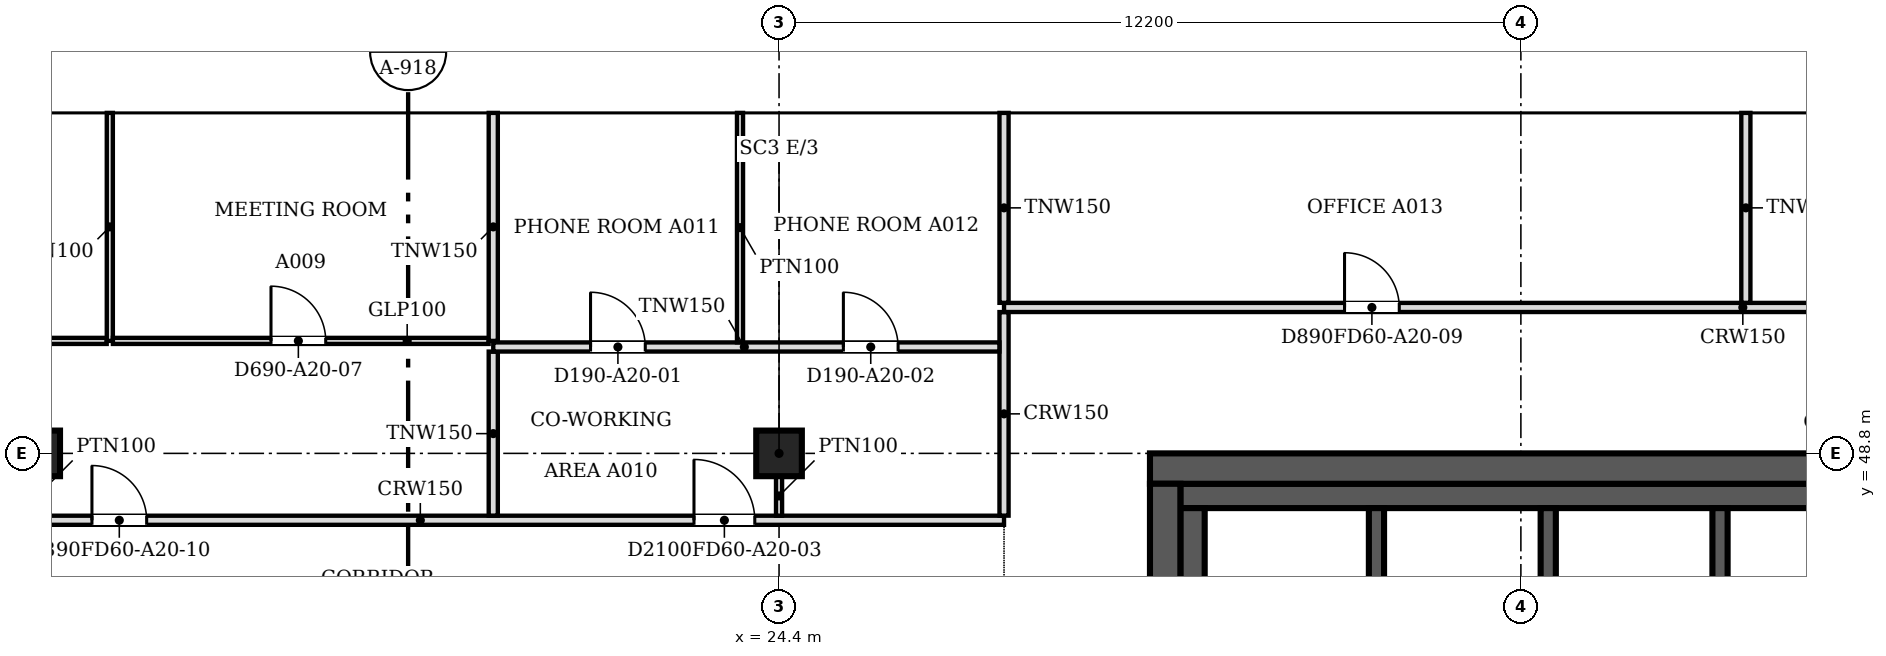
"""IFC4 building model, lengths in metres.
Left out: names, types, materials, properties, quantities, classifications, styles, units other than length and angle.
Written with IfcOpenShell. Run it as: python <this file> out.ifc"""

import sys

from ifc_helpers import new_model, si_unit, direction, frame, frame_2d, origin, origin_2d, place, context, subcontext, project, spatial, polyline, rectangle, outline, extrude, faceted_brep, source, transform, mapped, element, fill, save


model = new_model("IFC4")
c1 = context("Model", 3, precision=1e-05, world=origin(), true_north=direction((0.0, 1.0)))
c2 = subcontext(c1, "Body", "Model", "MODEL_VIEW")
j1 = project(units=[si_unit("LENGTHUNIT", "METRE"), si_unit("PLANEANGLEUNIT", "RADIAN")], contexts=[c1])
p1 = place(None, origin())
s1 = spatial("IfcSite", under=j1, at=p1, CompositionType="ELEMENT")
p2 = place(p1, origin())
s2 = spatial("IfcBuilding", under=s1, at=p2, CompositionType="ELEMENT")
p3 = place(p2, frame((0.0, 0.0, 228.3)))
s3 = spatial("IfcBuildingStorey", under=s2, at=p3, CompositionType="ELEMENT", Elevation=228.3)
for number, where, z_axis, x_axis in (
    (1, (12.2, 48.8, 0.0), (0.0, 0.0, 1.0), (1.0, 0.0, 0.0)),
    (2, (24.4, 48.8, 0.0), (0.0, 0.0, 1.0), (1.0, 0.0, 0.0)),
):
    element("IfcColumn", number, at=place(p3, frame(where, z_axis=z_axis, x_axis=x_axis)), inside=s3, PredefinedType="COLUMN", context=c2, shape_type="SweptSolid", body=[
        extrude(rectangle(XDim=0.75, YDim=0.75, at=origin_2d()), origin(), (0.0, 0.0, 1.0), 3.5),
    ])
m1 = source(origin(), c2, "Body", "SweptSolid", [
    extrude(outline(polyline([(3.05, 0.0), (6.1, 3.8), (3.05, 7.6), (0.0, 3.8), (3.05, 0.0)])), frame((0.0, 0.25, 0.0), z_axis=(0.0, -1.0, 0.0), x_axis=(1.0, 0.0, 0.0)), (0.0, 0.0, 1.0), 0.5),
])
p4 = place(p3, frame((45.75, 54.65, -3.8), z_axis=(0.0, 0.0, 1.0), x_axis=(-1.0, 0.0, 0.0)))
e3 = element("IfcWall", 3, at=p4, inside=s3, PredefinedType="SOLIDWALL", context=c2, shape_type="MappedRepresentation", body=[
    mapped(m1, transform((0.0, 0.0, 0.0), scale=1.0)),
])
m2 = source(origin(), c2, "Body", "SweptSolid", [
    extrude(outline(polyline([(3.05, 0.399), (5.78, 3.8), (3.05, 7.201), (0.321, 3.8), (3.05, 0.399)])), frame((0.0, 0.26, 0.0), z_axis=(0.0, -1.0, 0.0), x_axis=(1.0, 0.0, 0.0)), (0.0, 0.0, 1.0), 0.52),
])
p5 = place(p4, origin())
e4 = element("IfcOpeningElement", 4, at=p5, cuts=e3, PredefinedType="OPENING", context=c2, shape_type="MappedRepresentation", body=[
    mapped(m2, transform((0.0, 0.0, 0.0), scale=1.0)),
])
m3 = source(origin(), c2, "Body", "Brep", [
    faceted_brep([(3.05, -0.25, 0.0), (6.1, -0.25, 3.8), (6.1, -0.25, 3.8), (3.05, -0.25, 7.6), (0.0, -0.25, 3.8), (0.0, 0.25, 3.8), (3.05, 0.25, 7.6), (6.1, 0.25, 3.8), (6.1, 0.25, 3.8), (3.05, 0.25, 0.0)], [[[0, 1, 2, 3, 4]], [[5, 6, 7, 8, 9]], [[9, 8, 1, 0]], [[7, 6, 3, 2]], [[6, 5, 4, 3]], [[5, 9, 0, 4]], [[1, 8, 7, 2]]]),
])
p6 = place(p3, frame((39.65, 54.65, -3.8), z_axis=(0.0, 0.0, 1.0), x_axis=(-1.0, 0.0, 0.0)))
e5 = element("IfcWall", 5, at=p6, inside=s3, PredefinedType="SOLIDWALL", context=c2, shape_type="MappedRepresentation", body=[
    mapped(m3, transform((0.0, 0.0, 0.0), scale=1.0)),
])
p7 = place(p6, origin())
e6 = element("IfcOpeningElement", 6, at=p7, cuts=e5, PredefinedType="OPENING", context=c2, shape_type="MappedRepresentation", body=[
    mapped(m2, transform((0.0, 0.0, 0.0), scale=1.0)),
])
p8 = place(p3, frame((33.55, 54.65, -3.8), z_axis=(0.0, 0.0, 1.0), x_axis=(-1.0, 0.0, 0.0)))
e7 = element("IfcWall", 7, at=p8, inside=s3, PredefinedType="SOLIDWALL", context=c2, shape_type="MappedRepresentation", body=[
    mapped(m1, transform((0.0, 0.0, 0.0), scale=1.0)),
])
p9 = place(p8, origin())
e8 = element("IfcOpeningElement", 8, at=p9, cuts=e7, PredefinedType="OPENING", context=c2, shape_type="MappedRepresentation", body=[
    mapped(m2, transform((0.0, 0.0, 0.0), scale=1.0)),
])
p10 = place(p3, frame((27.45, 54.65, -3.8), z_axis=(0.0, 0.0, 1.0), x_axis=(-1.0, 0.0, 0.0)))
e9 = element("IfcWall", 9, at=p10, inside=s3, PredefinedType="SOLIDWALL", context=c2, shape_type="MappedRepresentation", body=[
    mapped(m3, transform((0.0, 0.0, 0.0), scale=1.0)),
])
p11 = place(p10, origin())
e10 = element("IfcOpeningElement", 10, at=p11, cuts=e9, PredefinedType="OPENING", context=c2, shape_type="MappedRepresentation", body=[
    mapped(m2, transform((0.0, 0.0, 0.0), scale=1.0)),
])
p12 = place(p3, frame((21.35, 54.65, -3.8), z_axis=(0.0, 0.0, 1.0), x_axis=(-1.0, 0.0, 0.0)))
e11 = element("IfcWall", 11, at=p12, inside=s3, PredefinedType="SOLIDWALL", context=c2, shape_type="MappedRepresentation", body=[
    mapped(m1, transform((0.0, 0.0, 0.0), scale=1.0)),
])
p13 = place(p12, origin())
e12 = element("IfcOpeningElement", 12, at=p13, cuts=e11, PredefinedType="OPENING", context=c2, shape_type="MappedRepresentation", body=[
    mapped(m2, transform((0.0, 0.0, 0.0), scale=1.0)),
])
p14 = place(p3, frame((15.25, 54.65, -3.8), z_axis=(0.0, 0.0, 1.0), x_axis=(-1.0, 0.0, 0.0)))
e13 = element("IfcWall", 13, at=p14, inside=s3, PredefinedType="SOLIDWALL", context=c2, shape_type="MappedRepresentation", body=[
    mapped(m1, transform((0.0, 0.0, 0.0), scale=1.0)),
])
p15 = place(p14, origin())
e14 = element("IfcOpeningElement", 14, at=p15, cuts=e13, PredefinedType="OPENING", context=c2, shape_type="MappedRepresentation", body=[
    mapped(m2, transform((0.0, 0.0, 0.0), scale=1.0)),
])
m4 = source(origin(), c2, "Body", "Brep", [
    faceted_brep([(3.05, -0.25, 0.0), (6.1, -0.25, 3.8), (6.1, -0.25, 3.8), (0.0, -0.25, 3.8), (0.0, 0.25, 3.8), (6.1, 0.25, 3.8), (6.1, 0.25, 3.8), (3.05, 0.25, 0.0)], [[[0, 1, 2, 3]], [[4, 5, 6, 7]], [[7, 6, 1, 0]], [[5, 4, 3, 2]], [[4, 7, 0, 3]], [[1, 6, 5, 2]]]),
])
p16 = place(p3, frame((42.7, 54.65, 0.0), z_axis=(0.0, 0.0, 1.0), x_axis=(-1.0, 0.0, 0.0)))
e15 = element("IfcWall", 15, at=p16, inside=s3, PredefinedType="SOLIDWALL", context=c2, shape_type="MappedRepresentation", body=[
    mapped(m4, transform((0.0, 0.0, 0.0), scale=1.0)),
])
m5 = source(origin(), c2, "Body", "SweptSolid", [
    extrude(outline(polyline([(3.05, 0.399), (5.579, 3.55), (0.521, 3.55), (3.05, 0.399)])), frame((0.0, 0.26, 0.0), z_axis=(0.0, -1.0, 0.0), x_axis=(1.0, 0.0, 0.0)), (0.0, 0.0, 1.0), 0.52),
])
p17 = place(p16, origin())
e16 = element("IfcOpeningElement", 16, at=p17, cuts=e15, PredefinedType="OPENING", context=c2, shape_type="MappedRepresentation", body=[
    mapped(m5, transform((0.0, 0.0, 0.0), scale=1.0)),
])
m6 = source(origin(), c2, "Body", "SweptSolid", [
    extrude(outline(polyline([(3.05, 0.0), (6.1, 3.8), (0.0, 3.8), (3.05, 0.0)])), frame((0.0, 0.25, 0.0), z_axis=(0.0, -1.0, 0.0), x_axis=(1.0, 0.0, 0.0)), (0.0, 0.0, 1.0), 0.5),
])
p18 = place(p3, frame((36.6, 54.65, 0.0), z_axis=(0.0, 0.0, 1.0), x_axis=(-1.0, 0.0, 0.0)))
e17 = element("IfcWall", 17, at=p18, inside=s3, PredefinedType="SOLIDWALL", context=c2, shape_type="MappedRepresentation", body=[
    mapped(m6, transform((0.0, 0.0, 0.0), scale=1.0)),
])
p19 = place(p18, origin())
e18 = element("IfcOpeningElement", 18, at=p19, cuts=e17, PredefinedType="OPENING", context=c2, shape_type="MappedRepresentation", body=[
    mapped(m5, transform((0.0, 0.0, 0.0), scale=1.0)),
])
p20 = place(p3, frame((30.5, 54.65, 0.0), z_axis=(0.0, 0.0, 1.0), x_axis=(-1.0, 0.0, 0.0)))
e19 = element("IfcWall", 19, at=p20, inside=s3, PredefinedType="SOLIDWALL", context=c2, shape_type="MappedRepresentation", body=[
    mapped(m6, transform((0.0, 0.0, 0.0), scale=1.0)),
])
p21 = place(p20, origin())
e20 = element("IfcOpeningElement", 20, at=p21, cuts=e19, PredefinedType="OPENING", context=c2, shape_type="MappedRepresentation", body=[
    mapped(m5, transform((0.0, 0.0, 0.0), scale=1.0)),
])
p22 = place(p3, frame((24.4, 54.65, 0.0), z_axis=(0.0, 0.0, 1.0), x_axis=(-1.0, 0.0, 0.0)))
e21 = element("IfcWall", 21, at=p22, inside=s3, PredefinedType="SOLIDWALL", context=c2, shape_type="MappedRepresentation", body=[
    mapped(m4, transform((0.0, 0.0, 0.0), scale=1.0)),
])
p23 = place(p22, origin())
e22 = element("IfcOpeningElement", 22, at=p23, cuts=e21, PredefinedType="OPENING", context=c2, shape_type="MappedRepresentation", body=[
    mapped(m5, transform((0.0, 0.0, 0.0), scale=1.0)),
])
p24 = place(p3, frame((18.3, 54.65, 0.0), z_axis=(0.0, 0.0, 1.0), x_axis=(-1.0, 0.0, 0.0)))
e23 = element("IfcWall", 23, at=p24, inside=s3, PredefinedType="SOLIDWALL", context=c2, shape_type="MappedRepresentation", body=[
    mapped(m6, transform((0.0, 0.0, 0.0), scale=1.0)),
])
p25 = place(p24, origin())
e24 = element("IfcOpeningElement", 24, at=p25, cuts=e23, PredefinedType="OPENING", context=c2, shape_type="MappedRepresentation", body=[
    mapped(m5, transform((0.0, 0.0, 0.0), scale=1.0)),
])
p26 = place(p3, frame((30.75, 24.9, 0.0), z_axis=(0.0, 0.0, 1.0), x_axis=(0.0, 1.0, 0.0)))
e25 = element("IfcWall", 25, at=p26, inside=s3, PredefinedType="SHEAR", context=c2, shape_type="SweptSolid", body=[
    extrude(rectangle(XDim=23.4, YDim=0.5, at=frame_2d((11.7, 0.0))), origin(), (0.0, 0.0, 1.0), 3.8),
])
m7 = source(origin(), c2, "Body", "SweptSolid", [
    extrude(rectangle(XDim=2.1, YDim=2.4, at=frame_2d((1.05, 1.2))), frame((0.0, 0.26, 0.0), z_axis=(0.0, -1.0, 0.0), x_axis=(1.0, 0.0, 0.0)), (0.0, 0.0, 1.0), 0.52),
])
p27 = place(p26, frame((4.9, 0.0, 0.0)))
e26 = element("IfcOpeningElement", 26, at=p27, cuts=e25, PredefinedType="OPENING", context=c2, shape_type="MappedRepresentation", body=[
    mapped(m7, transform((0.0, 0.0, 0.0), scale=1.0)),
])
p28 = place(p26, frame((16.4, 0.0, 0.0)))
e27 = element("IfcOpeningElement", 27, at=p28, cuts=e25, PredefinedType="OPENING", context=c2, shape_type="MappedRepresentation", body=[
    mapped(m7, transform((0.0, 0.0, 0.0), scale=1.0)),
])
p29 = place(p3, frame((30.5, 48.55, 0.0), z_axis=(0.0, 0.0, 1.0), x_axis=(1.0, 0.0, 0.0)))
e28 = element("IfcWall", 28, at=p29, inside=s3, PredefinedType="SHEAR", context=c2, shape_type="SweptSolid", body=[
    extrude(rectangle(XDim=24.4, YDim=0.5, at=frame_2d((12.2, 0.0))), origin(), (0.0, 0.0, 1.0), 3.8),
])
p30 = place(p3, frame((31.0, 48.1, 0.0), z_axis=(0.0, 0.0, 1.0), x_axis=(1.0, 0.0, 0.0)))
e29 = element("IfcWall", 29, at=p30, inside=s3, PredefinedType="SOLIDWALL", context=c2, shape_type="SweptSolid", body=[
    extrude(rectangle(XDim=23.4, YDim=0.4, at=frame_2d((11.7, 0.0))), origin(), (0.0, 0.0, 1.0), 3.8),
])
p31 = place(p3, frame((31.2, 43.4, 0.0), z_axis=(0.0, 0.0, 1.0), x_axis=(0.0, 1.0, 0.0)))
e30 = element("IfcWall", 30, at=p31, inside=s3, PredefinedType="SOLIDWALL", context=c2, shape_type="SweptSolid", body=[
    extrude(rectangle(XDim=4.5, YDim=0.4, at=frame_2d((2.25, 0.0))), origin(), (0.0, 0.0, 1.0), 3.8),
])
for number, where, z_axis, x_axis in (
    (31, (34.225, 45.025, 0.0), (0.0, 0.0, 1.0), (0.0, 1.0, 0.0)),
    (32, (37.05, 45.025, 0.0), (0.0, 0.0, 1.0), (0.0, 1.0, 0.0)),
    (33, (39.875, 45.025, 0.0), (0.0, 0.0, 1.0), (0.0, 1.0, 0.0)),
):
    element("IfcWall", number, at=place(p3, frame(where, z_axis=z_axis, x_axis=x_axis)), inside=s3, PredefinedType="SOLIDWALL", context=c2, shape_type="SweptSolid", body=[
        extrude(rectangle(XDim=2.875, YDim=0.25, at=frame_2d((1.438, 0.0))), origin(), (0.0, 0.0, 1.0), 3.8),
    ])
p32 = place(p3, frame((7.5, 47.7, 0.0), z_axis=(0.0, 0.0, 1.0), x_axis=(1.0, 0.0, 0.0)))
e34 = element("IfcWall", 34, at=p32, inside=s3, PredefinedType="PARTITIONING", context=c2, shape_type="SweptSolid", body=[
    extrude(rectangle(XDim=20.6, YDim=0.15, at=frame_2d((10.3, 0.0))), origin(), (0.0, 0.0, 1.0), 2.888),
])
m8 = source(origin(), c2, "Body", "SweptSolid", [
    extrude(rectangle(XDim=1.0, YDim=2.1, at=frame_2d((0.5, 1.05))), frame((0.0, 0.085, 0.0), z_axis=(0.0, -1.0, 0.0), x_axis=(1.0, 0.0, 0.0)), (0.0, 0.0, 1.0), 0.17),
])
p33 = place(p32, frame((15.501, 0.0, 0.0)))
e35 = element("IfcOpeningElement", 35, at=p33, cuts=e34, PredefinedType="OPENING", context=c2, shape_type="MappedRepresentation", body=[
    mapped(m8, transform((0.0, 0.0, 0.0), scale=1.0)),
])
m9 = source(origin(), c2, "Body", "SweptSolid", [
    extrude(rectangle(XDim=0.9, YDim=2.1, at=frame_2d((0.45, 1.05))), frame((0.0, 0.085, 0.0), z_axis=(0.0, -1.0, 0.0), x_axis=(1.0, 0.0, 0.0)), (0.0, 0.0, 1.0), 0.17),
])
p34 = place(p32, frame((5.6, 0.0, 0.0)))
e36 = element("IfcOpeningElement", 36, at=p34, cuts=e34, PredefinedType="OPENING", context=c2, shape_type="MappedRepresentation", body=[
    mapped(m9, transform((0.0, 0.0, 0.0), scale=1.0)),
])
p35 = place(p3, frame((19.7, 47.776, 0.0), z_axis=(0.0, 0.0, 1.0), x_axis=(0.0, 1.0, 0.0)))
e37 = element("IfcWall", 37, at=p35, inside=s3, PredefinedType="PARTITIONING", context=c2, shape_type="SweptSolid", body=[
    extrude(rectangle(XDim=2.698, YDim=0.15, at=frame_2d((1.349, 0.0))), origin(), (0.0, 0.0, 1.0), 2.888),
])
p36 = place(p3, frame((28.1, 47.776, 0.0), z_axis=(0.0, 0.0, 1.0), x_axis=(0.0, 1.0, 0.0)))
e38 = element("IfcWall", 38, at=p36, inside=s3, PredefinedType="PARTITIONING", context=c2, shape_type="SweptSolid", body=[
    extrude(rectangle(XDim=3.348, YDim=0.15, at=frame_2d((1.674, 0.0))), origin(), (0.0, 0.0, 1.0), 2.888),
])
p37 = place(p3, frame((24.4, 48.425, 0.0), z_axis=(0.0, 0.0, 1.0), x_axis=(0.0, -1.0, 0.0)))
e39 = element("IfcWall", 39, at=p37, inside=s3, PredefinedType="PARTITIONING", context=c2, shape_type="SweptSolid", body=[
    extrude(rectangle(XDim=0.65, YDim=0.1, at=frame_2d((0.325, 0.0))), origin(), (0.0, 0.0, 1.0), 2.888),
])
p38 = place(p3, frame((19.7, 50.55, 0.0), z_axis=(0.0, 0.0, 1.0), x_axis=(1.0, 0.0, 0.0)))
e40 = element("IfcWall", 40, at=p38, inside=s3, PredefinedType="PARTITIONING", context=c2, shape_type="SweptSolid", body=[
    extrude(rectangle(XDim=8.324, YDim=0.15, at=frame_2d((4.162, 0.0))), origin(), (0.0, 0.0, 1.0), 2.888),
])
p39 = place(p38, frame((1.6, 0.0, 0.0)))
e41 = element("IfcOpeningElement", 41, at=p39, cuts=e40, PredefinedType="OPENING", context=c2, shape_type="MappedRepresentation", body=[
    mapped(m9, transform((0.0, 0.0, 0.0), scale=1.0)),
])
p40 = place(p38, frame((5.758, 0.0, 0.0)))
e42 = element("IfcOpeningElement", 42, at=p40, cuts=e40, PredefinedType="OPENING", context=c2, shape_type="MappedRepresentation", body=[
    mapped(m9, transform((0.0, 0.0, 0.0), scale=1.0)),
])
p41 = place(p3, frame((23.758, 50.626, 0.0), z_axis=(0.0, 0.0, 1.0), x_axis=(0.0, 1.0, 0.0)))
e43 = element("IfcWall", 43, at=p41, inside=s3, PredefinedType="PARTITIONING", context=c2, shape_type="SweptSolid", body=[
    extrude(rectangle(XDim=3.774, YDim=0.1, at=frame_2d((1.887, 0.0))), origin(), (0.0, 0.0, 1.0), 2.888),
])
p42 = place(p3, frame((7.5, 50.65, 0.0), z_axis=(0.0, 0.0, 1.0), x_axis=(1.0, 0.0, 0.0)))
e44 = element("IfcWall", 44, at=p42, inside=s3, PredefinedType="PARTITIONING", context=c2, shape_type="SweptSolid", body=[
    extrude(rectangle(XDim=5.843, YDim=0.1, at=frame_2d((2.921, 0.0))), origin(), (0.0, 0.0, 1.0), 2.888),
])
m10 = source(origin(), c2, "Body", "SweptSolid", [
    extrude(rectangle(XDim=0.9, YDim=2.1, at=frame_2d((0.45, 1.05))), frame((0.0, 0.06, 0.0), z_axis=(0.0, -1.0, 0.0), x_axis=(1.0, 0.0, 0.0)), (0.0, 0.0, 1.0), 0.12),
])
p43 = place(p42, frame((2.5, 0.0, 0.0)))
e45 = element("IfcOpeningElement", 45, at=p43, cuts=e44, PredefinedType="OPENING", context=c2, shape_type="MappedRepresentation", body=[
    mapped(m10, transform((0.0, 0.0, 0.0), scale=1.0)),
])
p44 = place(p3, frame((13.394, 50.65, 0.0), z_axis=(0.0, 0.0, 1.0), x_axis=(0.0, 1.0, 0.0)))
e46 = element("IfcWall", 46, at=p44, inside=s3, PredefinedType="PARTITIONING", context=c2, shape_type="SweptSolid", body=[
    extrude(rectangle(XDim=3.75, YDim=0.1, at=frame_2d((1.875, 0.0))), origin(), (0.0, 0.0, 1.0), 2.888),
])
p45 = place(p3, frame((13.445, 50.65, 0.0), z_axis=(0.0, 0.0, 1.0), x_axis=(1.0, 0.0, 0.0)))
e47 = element("IfcWall", 47, at=p45, inside=s3, PredefinedType="PARTITIONING", context=c2, shape_type="SweptSolid", body=[
    extrude(rectangle(XDim=6.179, YDim=0.1, at=frame_2d((3.09, 0.0))), origin(), (0.0, 0.0, 1.0), 2.888),
])
p46 = place(p45, frame((2.6, 0.0, 0.0)))
e48 = element("IfcOpeningElement", 48, at=p46, cuts=e47, PredefinedType="OPENING", context=c2, shape_type="MappedRepresentation", body=[
    mapped(m10, transform((0.0, 0.0, 0.0), scale=1.0)),
])
p47 = place(p3, frame((19.7, 50.65, 0.0), z_axis=(0.0, 0.0, 1.0), x_axis=(0.0, 1.0, 0.0)))
e49 = element("IfcWall", 49, at=p47, inside=s3, PredefinedType="PARTITIONING", context=c2, shape_type="SweptSolid", body=[
    extrude(rectangle(XDim=3.75, YDim=0.15, at=frame_2d((1.875, 0.0))), origin(), (0.0, 0.0, 1.0), 2.888),
])
p48 = place(p3, frame((28.1, 51.2, 0.0), z_axis=(0.0, 0.0, 1.0), x_axis=(1.0, 0.0, 0.0)))
e50 = element("IfcWall", 50, at=p48, inside=s3, PredefinedType="PARTITIONING", context=c2, shape_type="SweptSolid", body=[
    extrude(rectangle(XDim=31.438, YDim=0.15, at=frame_2d((15.719, 0.0))), origin(), (0.0, 0.0, 1.0), 2.888),
])
p49 = place(p48, frame((27.501, 0.0, 0.0)))
e51 = element("IfcOpeningElement", 51, at=p49, cuts=e50, PredefinedType="OPENING", context=c2, shape_type="MappedRepresentation", body=[
    mapped(m9, transform((0.0, 0.0, 0.0), scale=1.0)),
])
p50 = place(p48, frame((5.6, 0.0, 0.0)))
e52 = element("IfcOpeningElement", 52, at=p50, cuts=e50, PredefinedType="OPENING", context=c2, shape_type="MappedRepresentation", body=[
    mapped(m9, transform((0.0, 0.0, 0.0), scale=1.0)),
])
p51 = place(p48, frame((17.8, 0.0, 0.0)))
e53 = element("IfcOpeningElement", 53, at=p51, cuts=e50, PredefinedType="OPENING", context=c2, shape_type="MappedRepresentation", body=[
    mapped(m9, transform((0.0, 0.0, 0.0), scale=1.0)),
])
for number, where, z_axis, x_axis in (
    (54, (28.1, 51.276, 0.0), (0.0, 0.0, 1.0), (0.0, 1.0, 0.0)),
    (55, (40.3, 51.276, 0.0), (0.0, 0.0, 1.0), (0.0, 1.0, 0.0)),
):
    element("IfcWall", number, at=place(p3, frame(where, z_axis=z_axis, x_axis=x_axis)), inside=s3, PredefinedType="PARTITIONING", context=c2, shape_type="SweptSolid", body=[
        extrude(rectangle(XDim=3.124, YDim=0.15, at=frame_2d((1.562, 0.0))), origin(), (0.0, 0.0, 1.0), 2.888),
    ])
m11 = source(origin(), c2, "Body", "SweptSolid", [
    extrude(rectangle(XDim=0.9, YDim=2.1, at=frame_2d((0.45, 1.05))), frame((0.0, 0.025, 0.0), z_axis=(0.0, -1.0, 0.0), x_axis=(1.0, 0.0, 0.0)), (0.0, 0.0, 1.0), 0.05),
])
p52 = place(p39, origin())
e56 = element("IfcDoor", 56, at=p52, inside=s3, OperationType="SINGLE_SWING_LEFT", PredefinedType="DOOR", context=c2, shape_type="MappedRepresentation", body=[
    mapped(m11, transform((0.0, 0.0, 0.0), scale=1.0)),
])
fill(e41, e56)
p53 = place(p40, origin())
e57 = element("IfcDoor", 57, at=p53, inside=s3, OperationType="SINGLE_SWING_LEFT", PredefinedType="DOOR", context=c2, shape_type="MappedRepresentation", body=[
    mapped(m11, transform((0.0, 0.0, 0.0), scale=1.0)),
])
fill(e42, e57)
p54 = place(p46, origin())
e58 = element("IfcDoor", 58, at=p54, inside=s3, OperationType="SINGLE_SWING_LEFT", PredefinedType="DOOR", context=c2, shape_type="MappedRepresentation", body=[
    mapped(m11, transform((0.0, 0.0, 0.0), scale=1.0)),
])
fill(e48, e58)
m12 = source(origin(), c2, "Body", "SweptSolid", [
    extrude(rectangle(XDim=1.0, YDim=2.1, at=frame_2d((0.5, 1.05))), frame((0.0, 0.025, 0.0), z_axis=(0.0, -1.0, 0.0), x_axis=(1.0, 0.0, 0.0)), (0.0, 0.0, 1.0), 0.05),
])
p55 = place(p33, origin())
e59 = element("IfcDoor", 59, at=p55, inside=s3, OperationType="SINGLE_SWING_LEFT", PredefinedType="DOOR", context=c2, shape_type="MappedRepresentation", body=[
    mapped(m12, transform((0.0, 0.0, 0.0), scale=1.0)),
])
fill(e35, e59)
p56 = place(p50, origin())
e60 = element("IfcDoor", 60, at=p56, inside=s3, OperationType="SINGLE_SWING_LEFT", PredefinedType="DOOR", context=c2, shape_type="MappedRepresentation", body=[
    mapped(m11, transform((0.0, 0.0, 0.0), scale=1.0)),
])
fill(e52, e60)
p57 = place(p34, origin())
e61 = element("IfcDoor", 61, at=p57, inside=s3, OperationType="SINGLE_SWING_LEFT", PredefinedType="DOOR", context=c2, shape_type="MappedRepresentation", body=[
    mapped(m11, transform((0.0, 0.0, 0.0), scale=1.0)),
])
fill(e36, e61)
save(model, sys.argv[1])
